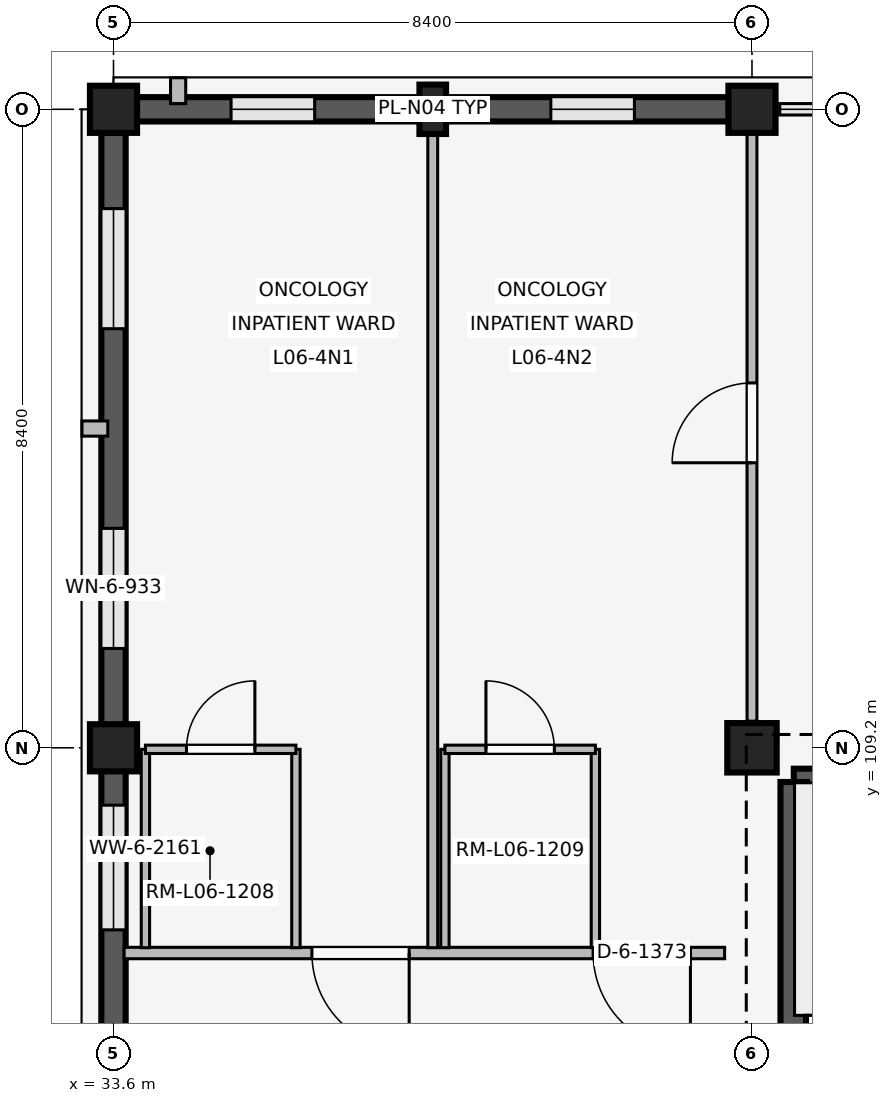
"""IFC4 building model, lengths in metres.
Left out: names, types, materials, properties, quantities, classifications, styles, units other than length and angle.
Written with IfcOpenShell. Run it as: python <this file> out.ifc"""

import sys

from ifc_helpers import new_model, si_unit, direction, frame, frame_2d, origin, origin_2d, place, context, subcontext, project, spatial, rectangle, extrude, element, fill, save


model = new_model("IFC4")
c1 = context("Model", 3, precision=1e-05, world=origin(), true_north=direction((0.0, 1.0)))
c2 = subcontext(c1, "Body", "Model", "MODEL_VIEW")
j1 = project(units=[si_unit("LENGTHUNIT", "METRE"), si_unit("PLANEANGLEUNIT", "RADIAN")], contexts=[c1])
p1 = place(None, origin())
s1 = spatial("IfcSite", under=j1, at=p1, CompositionType="ELEMENT")
p2 = place(p1, origin())
s2 = spatial("IfcBuilding", under=s1, at=p2, CompositionType="ELEMENT")
p3 = place(p2, frame((0.0, 0.0, 24.6)))
s3 = spatial("IfcBuildingStorey", under=s2, at=p3, CompositionType="ELEMENT", Elevation=24.6)
for number, where, z_axis, x_axis in (
    (1, (33.6, 109.2, 0.0), (0.0, 0.0, 1.0), (1.0, 0.0, 0.0)),
    (2, (33.6, 117.6, 0.0), (0.0, 0.0, 1.0), (1.0, 0.0, 0.0)),
):
    element("IfcColumn", number, at=place(p3, frame(where, z_axis=z_axis, x_axis=x_axis)), inside=s3, PredefinedType="COLUMN", context=c2, shape_type="SweptSolid", body=[
        extrude(rectangle(XDim=0.62, YDim=0.62, at=origin_2d()), origin(), (0.0, 0.0, 1.0), 4.2),
    ])
p4 = place(p3, frame((42.0, 109.2, 0.0), z_axis=(0.0, 0.0, 1.0), x_axis=(1.0, 0.0, 0.0)))
e3 = element("IfcColumn", 3, at=p4, inside=s3, PredefinedType="COLUMN", context=c2, shape_type="SweptSolid", body=[
    extrude(rectangle(XDim=0.65, YDim=0.65, at=origin_2d()), origin(), (0.0, 0.0, 1.0), 4.2),
])
p5 = place(p3, frame((42.0, 117.6, 0.0), z_axis=(0.0, 0.0, 1.0), x_axis=(1.0, 0.0, 0.0)))
e4 = element("IfcColumn", 4, at=p5, inside=s3, PredefinedType="COLUMN", context=c2, shape_type="SweptSolid", body=[
    extrude(rectangle(XDim=0.62, YDim=0.62, at=origin_2d()), origin(), (0.0, 0.0, 1.0), 4.2),
])
p6 = place(p3, frame((37.8, 117.6, 0.0), z_axis=(0.0, 0.0, 1.0), x_axis=(1.0, 0.0, 0.0)))
e5 = element("IfcColumn", 5, at=p6, inside=s3, PredefinedType="PILASTER", context=c2, shape_type="SweptSolid", body=[
    extrude(rectangle(XDim=0.35, YDim=0.65, at=origin_2d()), origin(), (0.0, 0.0, 1.0), 4.2),
])
p7 = place(p3, frame((33.6, 101.105, 0.0), z_axis=(0.0, 0.0, 1.0), x_axis=(0.0, 1.0, 0.0)))
e6 = element("IfcWall", 6, at=p7, inside=s3, PredefinedType="SOLIDWALL", context=c2, shape_type="SweptSolid", body=[
    extrude(rectangle(XDim=7.79, YDim=0.32, at=frame_2d((3.895, 0.0))), origin(), (0.0, 0.0, 1.0), 3.34),
])
p8 = place(p7, frame((0.5, 0.0, 0.85)))
e7 = element("IfcOpeningElement", 7, at=p8, cuts=e6, PredefinedType="OPENING", context=c2, shape_type="SweptSolid", body=[
    extrude(rectangle(XDim=1.64, YDim=1.75, at=frame_2d((0.82, 0.875))), frame((0.0, 0.17, 0.0), z_axis=(0.0, -1.0, 0.0), x_axis=(1.0, 0.0, 0.0)), (0.0, 0.0, 1.0), 0.34),
])
p9 = place(p7, frame((5.7, 0.0, 0.85)))
e8 = element("IfcOpeningElement", 8, at=p9, cuts=e6, PredefinedType="OPENING", context=c2, shape_type="SweptSolid", body=[
    extrude(rectangle(XDim=1.64, YDim=1.75, at=frame_2d((0.82, 0.875))), frame((0.0, 0.17, 0.0), z_axis=(0.0, -1.0, 0.0), x_axis=(1.0, 0.0, 0.0)), (0.0, 0.0, 1.0), 0.34),
])
p10 = place(p3, frame((33.905, 117.6, 0.0), z_axis=(0.0, 0.0, 1.0), x_axis=(1.0, 0.0, 0.0)))
e9 = element("IfcWall", 9, at=p10, inside=s3, PredefinedType="SOLIDWALL", context=c2, shape_type="SweptSolid", body=[
    extrude(rectangle(XDim=7.79, YDim=0.32, at=frame_2d((3.895, 0.0))), origin(), (0.0, 0.0, 1.0), 3.34),
])
p11 = place(p10, frame((1.242, 0.0, 0.85)))
e10 = element("IfcOpeningElement", 10, at=p11, cuts=e9, PredefinedType="OPENING", context=c2, shape_type="SweptSolid", body=[
    extrude(rectangle(XDim=1.1, YDim=1.6, at=frame_2d((0.55, 0.8))), frame((0.0, 0.17, 0.0), z_axis=(0.0, -1.0, 0.0), x_axis=(1.0, 0.0, 0.0)), (0.0, 0.0, 1.0), 0.34),
])
p12 = place(p10, frame((5.448, 0.0, 0.85)))
e11 = element("IfcOpeningElement", 11, at=p12, cuts=e9, PredefinedType="OPENING", context=c2, shape_type="SweptSolid", body=[
    extrude(rectangle(XDim=1.1, YDim=1.6, at=frame_2d((0.55, 0.8))), frame((0.0, 0.17, 0.0), z_axis=(0.0, -1.0, 0.0), x_axis=(1.0, 0.0, 0.0)), (0.0, 0.0, 1.0), 0.34),
])
p13 = place(p3, frame((34.45, 117.675, 0.0), z_axis=(0.0, 0.0, 1.0), x_axis=(0.0, 1.0, 0.0)))
e12 = element("IfcWall", 12, at=p13, inside=s3, PredefinedType="ELEMENTEDWALL", context=c2, shape_type="SweptSolid", body=[
    extrude(rectangle(XDim=0.34, YDim=0.2, at=frame_2d((0.17, 0.0))), origin(), (0.0, 0.0, 1.0), 3.32),
])
p14 = place(p3, frame((33.6, 109.505, 0.0), z_axis=(0.0, 0.0, 1.0), x_axis=(0.0, 1.0, 0.0)))
e13 = element("IfcWall", 13, at=p14, inside=s3, PredefinedType="SOLIDWALL", context=c2, shape_type="SweptSolid", body=[
    extrude(rectangle(XDim=7.79, YDim=0.32, at=frame_2d((3.895, 0.0))), origin(), (0.0, 0.0, 1.0), 3.34),
])
p15 = place(p14, frame((1.002, 0.0, 0.85)))
e14 = element("IfcOpeningElement", 14, at=p15, cuts=e13, PredefinedType="OPENING", context=c2, shape_type="SweptSolid", body=[
    extrude(rectangle(XDim=1.58, YDim=1.7, at=frame_2d((0.79, 0.85))), frame((0.0, 0.17, 0.0), z_axis=(0.0, -1.0, 0.0), x_axis=(1.0, 0.0, 0.0)), (0.0, 0.0, 1.0), 0.34),
])
p16 = place(p14, frame((5.208, 0.0, 0.85)))
e15 = element("IfcOpeningElement", 15, at=p16, cuts=e13, PredefinedType="OPENING", context=c2, shape_type="SweptSolid", body=[
    extrude(rectangle(XDim=1.58, YDim=1.7, at=frame_2d((0.79, 0.85))), frame((0.0, 0.17, 0.0), z_axis=(0.0, -1.0, 0.0), x_axis=(1.0, 0.0, 0.0)), (0.0, 0.0, 1.0), 0.34),
])
p17 = place(p3, frame((33.525, 113.4, 0.0), z_axis=(0.0, 0.0, 1.0), x_axis=(-1.0, 0.0, 0.0)))
e16 = element("IfcWall", 16, at=p17, inside=s3, PredefinedType="ELEMENTEDWALL", context=c2, shape_type="SweptSolid", body=[
    extrude(rectangle(XDim=0.34, YDim=0.2, at=frame_2d((0.17, 0.0))), origin(), (0.0, 0.0, 1.0), 3.32),
])
p18 = place(p3, frame((42.55, 108.75, 0.0), z_axis=(0.0, 0.0, 1.0), x_axis=(1.0, 0.0, 0.0)))
e17 = element("IfcWall", 17, at=p18, inside=s3, PredefinedType="SHEAR", context=c2, shape_type="SweptSolid", body=[
    extrude(rectangle(XDim=7.5, YDim=0.35, at=frame_2d((3.75, 0.0))), origin(), (0.0, 0.0, 1.0), 3.92),
])
p19 = place(p3, frame((42.55, 101.2, 0.0), z_axis=(0.0, 0.0, 1.0), x_axis=(0.0, 1.0, 0.0)))
e18 = element("IfcWall", 18, at=p19, inside=s3, PredefinedType="SHEAR", context=c2, shape_type="SweptSolid", body=[
    extrude(rectangle(XDim=7.55, YDim=0.35, at=frame_2d((3.775, 0.0))), origin(), (0.0, 0.0, 1.0), 3.92),
])
p20 = place(p19, frame((0.28, 0.0, 0.0)))
e19 = element("IfcOpeningElement", 19, at=p20, cuts=e18, PredefinedType="OPENING", context=c2, shape_type="SweptSolid", body=[
    extrude(rectangle(XDim=1.0, YDim=2.15, at=frame_2d((0.5, 1.075))), frame((0.0, 0.185, 0.0), z_axis=(0.0, -1.0, 0.0), x_axis=(1.0, 0.0, 0.0)), (0.0, 0.0, 1.0), 0.37),
])
p21 = place(p3, frame((41.64, 106.5, 0.0), z_axis=(0.0, 0.0, 1.0), x_axis=(-1.0, 0.0, 0.0)))
e20 = element("IfcWall", 20, at=p21, inside=s3, PredefinedType="PARTITIONING", context=c2, shape_type="SweptSolid", body=[
    extrude(rectangle(XDim=7.9, YDim=0.15, at=frame_2d((3.95, 0.0))), origin(), (0.0, 0.0, 1.0), 3.32),
])
p22 = place(p21, frame((0.45, 0.0, 0.0)))
e21 = element("IfcOpeningElement", 21, at=p22, cuts=e20, PredefinedType="OPENING", context=c2, shape_type="SweptSolid", body=[
    extrude(rectangle(XDim=1.28, YDim=2.2, at=frame_2d((0.64, 1.1))), frame((0.0, 0.085, 0.0), z_axis=(0.0, -1.0, 0.0), x_axis=(1.0, 0.0, 0.0)), (0.0, 0.0, 1.0), 0.17),
])
p23 = place(p21, frame((4.15, 0.0, 0.0)))
e22 = element("IfcOpeningElement", 22, at=p23, cuts=e20, PredefinedType="OPENING", context=c2, shape_type="SweptSolid", body=[
    extrude(rectangle(XDim=1.28, YDim=2.2, at=frame_2d((0.64, 1.1))), frame((0.0, 0.085, 0.0), z_axis=(0.0, -1.0, 0.0), x_axis=(1.0, 0.0, 0.0)), (0.0, 0.0, 1.0), 0.17),
])
p24 = place(p3, frame((37.8, 106.57, 0.0), z_axis=(0.0, 0.0, 1.0), x_axis=(0.0, 1.0, 0.0)))
e23 = element("IfcWall", 23, at=p24, inside=s3, PredefinedType="PARTITIONING", context=c2, shape_type="SweptSolid", body=[
    extrude(rectangle(XDim=10.93, YDim=0.13, at=frame_2d((5.465, 0.0))), origin(), (0.0, 0.0, 1.0), 3.32),
])
for number, where, z_axis, x_axis in (
    (24, (34.02, 106.57, 0.0), (0.0, 0.0, 1.0), (0.0, 1.0, 0.0)),
    (25, (36.0, 106.57, 0.0), (0.0, 0.0, 1.0), (0.0, 1.0, 0.0)),
):
    element("IfcWall", number, at=place(p3, frame(where, z_axis=z_axis, x_axis=x_axis)), inside=s3, PredefinedType="PARTITIONING", context=c2, shape_type="SweptSolid", body=[
        extrude(rectangle(XDim=2.61, YDim=0.11, at=frame_2d((1.305, 0.0))), origin(), (0.0, 0.0, 1.0), 3.32),
    ])
p25 = place(p3, frame((34.02, 109.18, 0.0), z_axis=(0.0, 0.0, 1.0), x_axis=(1.0, 0.0, 0.0)))
e26 = element("IfcWall", 26, at=p25, inside=s3, PredefinedType="PARTITIONING", context=c2, shape_type="SweptSolid", body=[
    extrude(rectangle(XDim=1.98, YDim=0.11, at=frame_2d((0.99, 0.0))), origin(), (0.0, 0.0, 1.0), 3.32),
])
p26 = place(p25, frame((0.54, 0.0, 0.0)))
e27 = element("IfcOpeningElement", 27, at=p26, cuts=e26, PredefinedType="OPENING", context=c2, shape_type="SweptSolid", body=[
    extrude(rectangle(XDim=0.9, YDim=2.1, at=frame_2d((0.45, 1.05))), frame((0.0, 0.065, 0.0), z_axis=(0.0, -1.0, 0.0), x_axis=(1.0, 0.0, 0.0)), (0.0, 0.0, 1.0), 0.13),
])
for number, where, z_axis, x_axis in (
    (28, (37.96, 106.57, 0.0), (0.0, 0.0, 1.0), (0.0, 1.0, 0.0)),
    (29, (39.94, 106.57, 0.0), (0.0, 0.0, 1.0), (0.0, 1.0, 0.0)),
):
    element("IfcWall", number, at=place(p3, frame(where, z_axis=z_axis, x_axis=x_axis)), inside=s3, PredefinedType="PARTITIONING", context=c2, shape_type="SweptSolid", body=[
        extrude(rectangle(XDim=2.61, YDim=0.11, at=frame_2d((1.305, 0.0))), origin(), (0.0, 0.0, 1.0), 3.32),
    ])
p27 = place(p3, frame((37.96, 109.18, 0.0), z_axis=(0.0, 0.0, 1.0), x_axis=(1.0, 0.0, 0.0)))
e30 = element("IfcWall", 30, at=p27, inside=s3, PredefinedType="PARTITIONING", context=c2, shape_type="SweptSolid", body=[
    extrude(rectangle(XDim=1.98, YDim=0.11, at=frame_2d((0.99, 0.0))), origin(), (0.0, 0.0, 1.0), 3.32),
])
p28 = place(p27, frame((0.54, 0.0, 0.0)))
e31 = element("IfcOpeningElement", 31, at=p28, cuts=e30, PredefinedType="OPENING", context=c2, shape_type="SweptSolid", body=[
    extrude(rectangle(XDim=0.9, YDim=2.1, at=frame_2d((0.45, 1.05))), frame((0.0, 0.065, 0.0), z_axis=(0.0, -1.0, 0.0), x_axis=(1.0, 0.0, 0.0)), (0.0, 0.0, 1.0), 0.13),
])
p29 = place(p3, frame((42.0, 109.55, 0.0), z_axis=(0.0, 0.0, 1.0), x_axis=(0.0, 1.0, 0.0)))
e32 = element("IfcWall", 32, at=p29, inside=s3, PredefinedType="PARTITIONING", context=c2, shape_type="SweptSolid", body=[
    extrude(rectangle(XDim=7.91, YDim=0.13, at=frame_2d((3.955, 0.0))), origin(), (0.0, 0.0, 1.0), 3.32),
])
p30 = place(p29, frame((3.4, 0.0, 0.0)))
e33 = element("IfcOpeningElement", 33, at=p30, cuts=e32, PredefinedType="OPENING", context=c2, shape_type="SweptSolid", body=[
    extrude(rectangle(XDim=1.05, YDim=2.2, at=frame_2d((0.525, 1.1))), frame((0.0, 0.075, 0.0), z_axis=(0.0, -1.0, 0.0), x_axis=(1.0, 0.0, 0.0)), (0.0, 0.0, 1.0), 0.15),
])
p31 = place(p9, origin())
e34 = element("IfcWindow", 34, at=p31, inside=s3, PartitioningType="SINGLE_PANEL", PredefinedType="WINDOW", context=c2, shape_type="SweptSolid", body=[
    extrude(rectangle(XDim=1.64, YDim=1.75, at=frame_2d((0.82, 0.875))), frame((0.0, 0.03, 0.0), z_axis=(0.0, -1.0, 0.0), x_axis=(1.0, 0.0, 0.0)), (0.0, 0.0, 1.0), 0.06),
])
fill(e8, e34)
p32 = place(p11, origin())
e35 = element("IfcWindow", 35, at=p32, inside=s3, PartitioningType="SINGLE_PANEL", PredefinedType="WINDOW", context=c2, shape_type="SweptSolid", body=[
    extrude(rectangle(XDim=1.1, YDim=1.6, at=frame_2d((0.55, 0.8))), frame((0.0, 0.03, 0.0), z_axis=(0.0, -1.0, 0.0), x_axis=(1.0, 0.0, 0.0)), (0.0, 0.0, 1.0), 0.06),
])
fill(e10, e35)
p33 = place(p12, origin())
e36 = element("IfcWindow", 36, at=p33, inside=s3, PartitioningType="SINGLE_PANEL", PredefinedType="WINDOW", context=c2, shape_type="SweptSolid", body=[
    extrude(rectangle(XDim=1.1, YDim=1.6, at=frame_2d((0.55, 0.8))), frame((0.0, 0.03, 0.0), z_axis=(0.0, -1.0, 0.0), x_axis=(1.0, 0.0, 0.0)), (0.0, 0.0, 1.0), 0.06),
])
fill(e11, e36)
p34 = place(p15, origin())
e37 = element("IfcWindow", 37, at=p34, inside=s3, PartitioningType="SINGLE_PANEL", PredefinedType="WINDOW", context=c2, shape_type="SweptSolid", body=[
    extrude(rectangle(XDim=1.58, YDim=1.7, at=frame_2d((0.79, 0.85))), frame((0.0, 0.03, 0.0), z_axis=(0.0, -1.0, 0.0), x_axis=(1.0, 0.0, 0.0)), (0.0, 0.0, 1.0), 0.06),
])
fill(e14, e37)
p35 = place(p16, origin())
e38 = element("IfcWindow", 38, at=p35, inside=s3, PartitioningType="SINGLE_PANEL", PredefinedType="WINDOW", context=c2, shape_type="SweptSolid", body=[
    extrude(rectangle(XDim=1.58, YDim=1.7, at=frame_2d((0.79, 0.85))), frame((0.0, 0.03, 0.0), z_axis=(0.0, -1.0, 0.0), x_axis=(1.0, 0.0, 0.0)), (0.0, 0.0, 1.0), 0.06),
])
fill(e15, e38)
p36 = place(p22, origin())
e39 = element("IfcDoor", 39, at=p36, inside=s3, OperationType="SINGLE_SWING_LEFT", PredefinedType="DOOR", context=c2, shape_type="SweptSolid", body=[
    extrude(rectangle(XDim=1.28, YDim=2.2, at=frame_2d((0.64, 1.1))), frame((0.0, 0.025, 0.0), z_axis=(0.0, -1.0, 0.0), x_axis=(1.0, 0.0, 0.0)), (0.0, 0.0, 1.0), 0.05),
])
fill(e21, e39)
p37 = place(p23, origin())
e40 = element("IfcDoor", 40, at=p37, inside=s3, OperationType="SINGLE_SWING_LEFT", PredefinedType="DOOR", context=c2, shape_type="SweptSolid", body=[
    extrude(rectangle(XDim=1.28, YDim=2.2, at=frame_2d((0.64, 1.1))), frame((0.0, 0.025, 0.0), z_axis=(0.0, -1.0, 0.0), x_axis=(1.0, 0.0, 0.0)), (0.0, 0.0, 1.0), 0.05),
])
fill(e22, e40)
p38 = place(p26, origin())
e41 = element("IfcDoor", 41, at=p38, inside=s3, OperationType="SINGLE_SWING_RIGHT", PredefinedType="DOOR", context=c2, shape_type="SweptSolid", body=[
    extrude(rectangle(XDim=0.9, YDim=2.1, at=frame_2d((0.45, 1.05))), frame((0.0, 0.025, 0.0), z_axis=(0.0, -1.0, 0.0), x_axis=(1.0, 0.0, 0.0)), (0.0, 0.0, 1.0), 0.05),
])
fill(e27, e41)
p39 = place(p28, origin())
e42 = element("IfcDoor", 42, at=p39, inside=s3, OperationType="SINGLE_SWING_LEFT", PredefinedType="DOOR", context=c2, shape_type="SweptSolid", body=[
    extrude(rectangle(XDim=0.9, YDim=2.1, at=frame_2d((0.45, 1.05))), frame((0.0, 0.025, 0.0), z_axis=(0.0, -1.0, 0.0), x_axis=(1.0, 0.0, 0.0)), (0.0, 0.0, 1.0), 0.05),
])
fill(e31, e42)
p40 = place(p30, origin())
e43 = element("IfcDoor", 43, at=p40, inside=s3, OperationType="SINGLE_SWING_LEFT", PredefinedType="DOOR", context=c2, shape_type="SweptSolid", body=[
    extrude(rectangle(XDim=1.05, YDim=2.2, at=frame_2d((0.525, 1.1))), frame((0.0, 0.025, 0.0), z_axis=(0.0, -1.0, 0.0), x_axis=(1.0, 0.0, 0.0)), (0.0, 0.0, 1.0), 0.05),
])
fill(e33, e43)
save(model, sys.argv[1])
